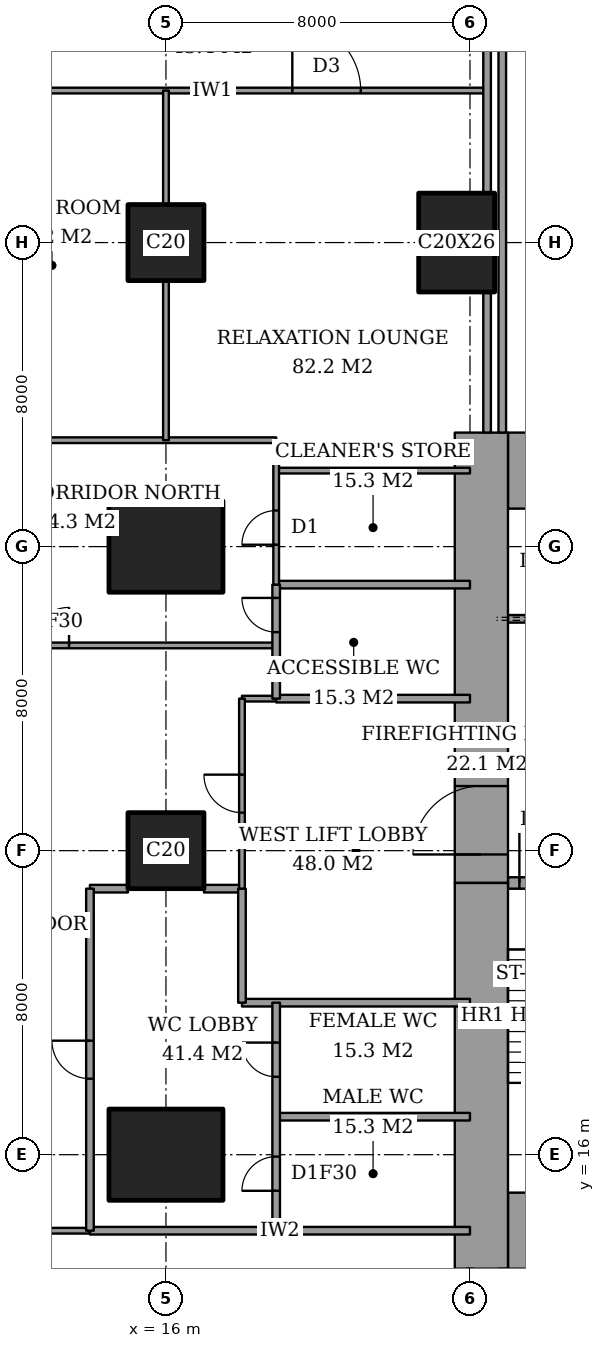
"""IFC4 building model, lengths in metres.
Left out: names, types, materials, properties, quantities, classifications, styles, units other than length and angle.
Written with IfcOpenShell. Run it as: python <this file> out.ifc"""

import sys

from ifc_helpers import new_model, si_unit, direction, frame, frame_2d, origin, origin_2d, place, context, subcontext, project, spatial, rectangle, extrude, element, fill, save


model = new_model("IFC4")
c1 = context("Model", 3, precision=1e-05, world=origin(), true_north=direction((0.0, 1.0)))
c2 = subcontext(c1, "Body", "Model", "MODEL_VIEW")
j1 = project(units=[si_unit("LENGTHUNIT", "METRE"), si_unit("PLANEANGLEUNIT", "RADIAN")], contexts=[c1])
p1 = place(None, origin())
s1 = spatial("IfcSite", under=j1, at=p1, CompositionType="ELEMENT")
p2 = place(p1, origin())
s2 = spatial("IfcBuilding", under=s1, at=p2, CompositionType="ELEMENT")
p3 = place(p2, frame((0.0, 0.0, 11.0)))
s3 = spatial("IfcBuildingStorey", under=s2, at=p3, CompositionType="ELEMENT", Elevation=11.0)
p4 = place(p3, frame((16.0, 16.0, 0.0), z_axis=(0.0, 0.0, 1.0), x_axis=(1.0, 0.0, 0.0)))
e1 = element("IfcColumn", 1, at=p4, inside=s3, PredefinedType="COLUMN", context=c2, shape_type="SweptSolid", body=[
    extrude(rectangle(XDim=3.0, YDim=2.4, at=origin_2d()), origin(), (0.0, 0.0, 1.0), 5.0),
])
p5 = place(p3, frame((16.0, 24.0, 0.0), z_axis=(0.0, 0.0, 1.0), x_axis=(1.0, 0.0, 0.0)))
e2 = element("IfcColumn", 2, at=p5, inside=s3, PredefinedType="COLUMN", context=c2, shape_type="SweptSolid", body=[
    extrude(rectangle(XDim=2.0, YDim=2.0, at=origin_2d()), origin(), (0.0, 0.0, 1.0), 5.0),
])
p6 = place(p3, frame((16.0, 32.0, 0.0), z_axis=(0.0, 0.0, 1.0), x_axis=(1.0, 0.0, 0.0)))
e3 = element("IfcColumn", 3, at=p6, inside=s3, PredefinedType="COLUMN", context=c2, shape_type="SweptSolid", body=[
    extrude(rectangle(XDim=3.0, YDim=2.4, at=origin_2d()), origin(), (0.0, 0.0, 1.0), 5.0),
])
p7 = place(p3, frame((16.0, 40.0, 0.0), z_axis=(0.0, 0.0, 1.0), x_axis=(1.0, 0.0, 0.0)))
e4 = element("IfcColumn", 4, at=p7, inside=s3, PredefinedType="COLUMN", context=c2, shape_type="SweptSolid", body=[
    extrude(rectangle(XDim=2.0, YDim=2.0, at=origin_2d()), origin(), (0.0, 0.0, 1.0), 5.0),
])
p8 = place(p3, frame((23.65, 40.0, 0.0), z_axis=(0.0, 0.0, 1.0), x_axis=(1.0, 0.0, 0.0)))
e5 = element("IfcColumn", 5, at=p8, inside=s3, PredefinedType="COLUMN", context=c2, shape_type="SweptSolid", body=[
    extrude(rectangle(XDim=2.0, YDim=2.6, at=origin_2d()), origin(), (0.0, 0.0, 1.0), 5.0),
])
for number, where, z_axis, x_axis in (
    (6, (25.0, 14.0, 0.0), (0.0, 0.0, 1.0), (1.0, 0.0, 0.0)),
    (7, (25.0, 34.0, 0.0), (0.0, 0.0, 1.0), (1.0, 0.0, 0.0)),
):
    element("IfcWall", number, at=place(p3, frame(where, z_axis=z_axis, x_axis=x_axis)), inside=s3, PredefinedType="SHEAR", context=c2, shape_type="SweptSolid", body=[
        extrude(rectangle(XDim=3.15, YDim=2.0, at=frame_2d((1.575, 0.0))), origin(), (0.0, 0.0, 1.0), 5.0),
    ])
p9 = place(p3, frame((24.3, 13.0, 0.0), z_axis=(0.0, 0.0, 1.0), x_axis=(0.0, 1.0, 0.0)))
e8 = element("IfcWall", 8, at=p9, inside=s3, PredefinedType="SHEAR", context=c2, shape_type="SweptSolid", body=[
    extrude(rectangle(XDim=10.15, YDim=1.4, at=frame_2d((5.075, 0.0))), origin(), (0.0, 0.0, 1.0), 5.0),
])
p10 = place(p3, frame((24.3, 23.15, 0.0), z_axis=(0.0, 0.0, 1.0), x_axis=(0.0, 1.0, 0.0)))
e9 = element("IfcWall", 9, at=p10, inside=s3, PredefinedType="SHEAR", context=c2, shape_type="SweptSolid", body=[
    extrude(rectangle(XDim=11.85, YDim=1.4, at=frame_2d((5.925, 0.0))), origin(), (0.0, 0.0, 1.0), 5.0),
])
p11 = place(p10, frame((0.75, 0.0, 0.0)))
e10 = element("IfcOpeningElement", 10, at=p11, cuts=e9, PredefinedType="OPENING", context=c2, shape_type="SweptSolid", body=[
    extrude(rectangle(XDim=1.8, YDim=2.4, at=frame_2d((0.9, 1.2))), frame((0.0, 0.71, 0.0), z_axis=(0.0, -1.0, 0.0), x_axis=(1.0, 0.0, 0.0)), (0.0, 0.0, 1.0), 1.42),
])
p12 = place(p3, frame((25.0, 23.15, 0.0), z_axis=(0.0, 0.0, 1.0), x_axis=(1.0, 0.0, 0.0)))
e11 = element("IfcWall", 11, at=p12, inside=s3, PredefinedType="SHEAR", context=c2, shape_type="SweptSolid", body=[
    extrude(rectangle(XDim=3.15, YDim=0.3, at=frame_2d((1.575, 0.0))), origin(), (0.0, 0.0, 1.0), 5.0),
])
p13 = place(p12, frame((0.3, 0.0, 0.0)))
e12 = element("IfcOpeningElement", 12, at=p13, cuts=e11, PredefinedType="OPENING", context=c2, shape_type="SweptSolid", body=[
    extrude(rectangle(XDim=1.6, YDim=2.1, at=frame_2d((0.8, 1.05))), frame((0.0, 0.16, 0.0), z_axis=(0.0, -1.0, 0.0), x_axis=(1.0, 0.0, 0.0)), (0.0, 0.0, 1.0), 0.32),
])
p14 = place(p3, frame((14.0, 14.0, 0.0), z_axis=(0.0, 0.0, 1.0), x_axis=(1.0, 0.0, 0.0)))
e13 = element("IfcWall", 13, at=p14, inside=s3, PredefinedType="PARTITIONING", context=c2, shape_type="SweptSolid", body=[
    extrude(rectangle(XDim=10.0, YDim=0.2, at=frame_2d((5.0, 0.0))), origin(), (0.0, 0.0, 1.0), 4.7),
])
p15 = place(p3, frame((9.5, 14.0, 0.0), z_axis=(0.0, 0.0, 1.0), x_axis=(1.0, 0.0, 0.0)))
e14 = element("IfcWall", 14, at=p15, inside=s3, PredefinedType="PARTITIONING", context=c2, shape_type="SweptSolid", body=[
    extrude(rectangle(XDim=4.5, YDim=0.15, at=frame_2d((2.25, 0.0))), origin(), (0.0, 0.0, 1.0), 4.7),
])
p16 = place(p15, frame((1.75, 0.0, 0.0)))
e15 = element("IfcOpeningElement", 15, at=p16, cuts=e14, PredefinedType="OPENING", context=c2, shape_type="SweptSolid", body=[
    extrude(rectangle(XDim=1.0, YDim=2.1, at=frame_2d((0.5, 1.05))), frame((0.0, 0.085, 0.0), z_axis=(0.0, -1.0, 0.0), x_axis=(1.0, 0.0, 0.0)), (0.0, 0.0, 1.0), 0.17),
])
p17 = place(p3, frame((18.9, 17.0, 0.0), z_axis=(0.0, 0.0, 1.0), x_axis=(1.0, 0.0, 0.0)))
e16 = element("IfcWall", 16, at=p17, inside=s3, PredefinedType="PARTITIONING", context=c2, shape_type="SweptSolid", body=[
    extrude(rectangle(XDim=5.1, YDim=0.2, at=frame_2d((2.55, 0.0))), origin(), (0.0, 0.0, 1.0), 4.7),
])
p18 = place(p3, frame((18.0, 20.0, 0.0), z_axis=(0.0, 0.0, 1.0), x_axis=(1.0, 0.0, 0.0)))
e17 = element("IfcWall", 17, at=p18, inside=s3, PredefinedType="PARTITIONING", context=c2, shape_type="SweptSolid", body=[
    extrude(rectangle(XDim=6.0, YDim=0.2, at=frame_2d((3.0, 0.0))), origin(), (0.0, 0.0, 1.0), 4.7),
])
for number, where, z_axis, x_axis in (
    (18, (14.0, 23.0, 0.0), (0.0, 0.0, 1.0), (1.0, 0.0, 0.0)),
    (19, (17.0, 23.0, 0.0), (0.0, 0.0, 1.0), (1.0, 0.0, 0.0)),
):
    element("IfcWall", number, at=place(p3, frame(where, z_axis=z_axis, x_axis=x_axis)), inside=s3, PredefinedType="PARTITIONING", context=c2, shape_type="SweptSolid", body=[
        extrude(rectangle(XDim=1.0, YDim=0.2, at=frame_2d((0.5, 0.0))), origin(), (0.0, 0.0, 1.0), 4.7),
    ])
p19 = place(p3, frame((18.9, 28.0, 0.0), z_axis=(0.0, 0.0, 1.0), x_axis=(1.0, 0.0, 0.0)))
e20 = element("IfcWall", 20, at=p19, inside=s3, PredefinedType="PARTITIONING", context=c2, shape_type="SweptSolid", body=[
    extrude(rectangle(XDim=5.1, YDim=0.2, at=frame_2d((2.55, 0.0))), origin(), (0.0, 0.0, 1.0), 4.7),
])
p20 = place(p3, frame((18.0, 28.0, 0.0), z_axis=(0.0, 0.0, 1.0), x_axis=(1.0, 0.0, 0.0)))
e21 = element("IfcWall", 21, at=p20, inside=s3, PredefinedType="PARTITIONING", context=c2, shape_type="SweptSolid", body=[
    extrude(rectangle(XDim=0.9, YDim=0.15, at=frame_2d((0.45, 0.0))), origin(), (0.0, 0.0, 1.0), 4.7),
])
p21 = place(p3, frame((6.0, 29.4, 0.0), z_axis=(0.0, 0.0, 1.0), x_axis=(1.0, 0.0, 0.0)))
e22 = element("IfcWall", 22, at=p21, inside=s3, PredefinedType="PARTITIONING", context=c2, shape_type="SweptSolid", body=[
    extrude(rectangle(XDim=12.9, YDim=0.15, at=frame_2d((6.45, 0.0))), origin(), (0.0, 0.0, 1.0), 4.7),
])
p22 = place(p21, frame((6.45, 0.0, 0.0)))
e23 = element("IfcOpeningElement", 23, at=p22, cuts=e22, PredefinedType="OPENING", context=c2, shape_type="SweptSolid", body=[
    extrude(rectangle(XDim=1.0, YDim=2.1, at=frame_2d((0.5, 1.05))), frame((0.0, 0.085, 0.0), z_axis=(0.0, -1.0, 0.0), x_axis=(1.0, 0.0, 0.0)), (0.0, 0.0, 1.0), 0.17),
])
p23 = place(p3, frame((18.9, 31.0, 0.0), z_axis=(0.0, 0.0, 1.0), x_axis=(1.0, 0.0, 0.0)))
e24 = element("IfcWall", 24, at=p23, inside=s3, PredefinedType="PARTITIONING", context=c2, shape_type="SweptSolid", body=[
    extrude(rectangle(XDim=5.1, YDim=0.2, at=frame_2d((2.55, 0.0))), origin(), (0.0, 0.0, 1.0), 4.7),
])
p24 = place(p3, frame((18.9, 34.0, 0.0), z_axis=(0.0, 0.0, 1.0), x_axis=(1.0, 0.0, 0.0)))
e25 = element("IfcWall", 25, at=p24, inside=s3, PredefinedType="PARTITIONING", context=c2, shape_type="SweptSolid", body=[
    extrude(rectangle(XDim=5.1, YDim=0.15, at=frame_2d((2.55, 0.0))), origin(), (0.0, 0.0, 1.0), 4.7),
])
p25 = place(p3, frame((7.0, 34.8, 0.0), z_axis=(0.0, 0.0, 1.0), x_axis=(1.0, 0.0, 0.0)))
e26 = element("IfcWall", 26, at=p25, inside=s3, PredefinedType="PARTITIONING", context=c2, shape_type="SweptSolid", body=[
    extrude(rectangle(XDim=11.9, YDim=0.15, at=frame_2d((5.95, 0.0))), origin(), (0.0, 0.0, 1.0), 4.7),
])
p26 = place(p25, frame((1.0, 0.0, 0.0)))
e27 = element("IfcOpeningElement", 27, at=p26, cuts=e26, PredefinedType="OPENING", context=c2, shape_type="SweptSolid", body=[
    extrude(rectangle(XDim=1.0, YDim=2.1, at=frame_2d((0.5, 1.05))), frame((0.0, 0.085, 0.0), z_axis=(0.0, -1.0, 0.0), x_axis=(1.0, 0.0, 0.0)), (0.0, 0.0, 1.0), 0.17),
])
p27 = place(p3, frame((10.0, 44.0, 0.0), z_axis=(0.0, 0.0, 1.0), x_axis=(1.0, 0.0, 0.0)))
e28 = element("IfcWall", 28, at=p27, inside=s3, PredefinedType="PARTITIONING", context=c2, shape_type="SweptSolid", body=[
    extrude(rectangle(XDim=14.45, YDim=0.15, at=frame_2d((7.225, 0.0))), origin(), (0.0, 0.0, 1.0), 4.7),
])
p28 = place(p27, frame((9.325, 0.0, 0.0)))
e29 = element("IfcOpeningElement", 29, at=p28, cuts=e28, PredefinedType="OPENING", context=c2, shape_type="SweptSolid", body=[
    extrude(rectangle(XDim=1.8, YDim=2.1, at=frame_2d((0.9, 1.05))), frame((0.0, 0.085, 0.0), z_axis=(0.0, -1.0, 0.0), x_axis=(1.0, 0.0, 0.0)), (0.0, 0.0, 1.0), 0.17),
])
p29 = place(p3, frame((14.0, 14.0, 0.0), z_axis=(0.0, 0.0, 1.0), x_axis=(0.0, 1.0, 0.0)))
e30 = element("IfcWall", 30, at=p29, inside=s3, PredefinedType="PARTITIONING", context=c2, shape_type="SweptSolid", body=[
    extrude(rectangle(XDim=9.0, YDim=0.2, at=frame_2d((4.5, 0.0))), origin(), (0.0, 0.0, 1.0), 4.7),
])
p30 = place(p29, frame((4.0, 0.0, 0.0)))
e31 = element("IfcOpeningElement", 31, at=p30, cuts=e30, PredefinedType="OPENING", context=c2, shape_type="SweptSolid", body=[
    extrude(rectangle(XDim=1.0, YDim=2.1, at=frame_2d((0.5, 1.05))), frame((0.0, 0.11, 0.0), z_axis=(0.0, -1.0, 0.0), x_axis=(1.0, 0.0, 0.0)), (0.0, 0.0, 1.0), 0.22),
])
p31 = place(p3, frame((16.0, 34.8, 0.0), z_axis=(0.0, 0.0, 1.0), x_axis=(0.0, 1.0, 0.0)))
e32 = element("IfcWall", 32, at=p31, inside=s3, PredefinedType="PARTITIONING", context=c2, shape_type="SweptSolid", body=[
    extrude(rectangle(XDim=4.2, YDim=0.15, at=frame_2d((2.1, 0.0))), origin(), (0.0, 0.0, 1.0), 3.3),
])
p32 = place(p3, frame((16.0, 41.0, 0.0), z_axis=(0.0, 0.0, 1.0), x_axis=(0.0, 1.0, 0.0)))
e33 = element("IfcWall", 33, at=p32, inside=s3, PredefinedType="PARTITIONING", context=c2, shape_type="SweptSolid", body=[
    extrude(rectangle(XDim=3.0, YDim=0.15, at=frame_2d((1.5, 0.0))), origin(), (0.0, 0.0, 1.0), 3.3),
])
p33 = place(p3, frame((18.0, 20.0, 0.0), z_axis=(0.0, 0.0, 1.0), x_axis=(0.0, 1.0, 0.0)))
e34 = element("IfcWall", 34, at=p33, inside=s3, PredefinedType="PARTITIONING", context=c2, shape_type="SweptSolid", body=[
    extrude(rectangle(XDim=3.0, YDim=0.2, at=frame_2d((1.5, 0.0))), origin(), (0.0, 0.0, 1.0), 4.7),
])
p34 = place(p3, frame((18.0, 23.0, 0.0), z_axis=(0.0, 0.0, 1.0), x_axis=(0.0, 1.0, 0.0)))
e35 = element("IfcWall", 35, at=p34, inside=s3, PredefinedType="PARTITIONING", context=c2, shape_type="SweptSolid", body=[
    extrude(rectangle(XDim=5.0, YDim=0.15, at=frame_2d((2.5, 0.0))), origin(), (0.0, 0.0, 1.0), 4.7),
])
p35 = place(p34, frame((2.0, 0.0, 0.0)))
e36 = element("IfcOpeningElement", 36, at=p35, cuts=e35, PredefinedType="OPENING", context=c2, shape_type="SweptSolid", body=[
    extrude(rectangle(XDim=1.0, YDim=2.1, at=frame_2d((0.5, 1.05))), frame((0.0, 0.085, 0.0), z_axis=(0.0, -1.0, 0.0), x_axis=(1.0, 0.0, 0.0)), (0.0, 0.0, 1.0), 0.17),
])
p36 = place(p3, frame((18.9, 14.0, 0.0), z_axis=(0.0, 0.0, 1.0), x_axis=(0.0, 1.0, 0.0)))
e37 = element("IfcWall", 37, at=p36, inside=s3, PredefinedType="PARTITIONING", context=c2, shape_type="SweptSolid", body=[
    extrude(rectangle(XDim=6.0, YDim=0.2, at=frame_2d((3.0, 0.0))), origin(), (0.0, 0.0, 1.0), 4.7),
])
p37 = place(p36, frame((1.05, 0.0, 0.0)))
e38 = element("IfcOpeningElement", 38, at=p37, cuts=e37, PredefinedType="OPENING", context=c2, shape_type="SweptSolid", body=[
    extrude(rectangle(XDim=0.9, YDim=2.1, at=frame_2d((0.45, 1.05))), frame((0.0, 0.11, 0.0), z_axis=(0.0, -1.0, 0.0), x_axis=(1.0, 0.0, 0.0)), (0.0, 0.0, 1.0), 0.22),
])
p38 = place(p36, frame((4.05, 0.0, 0.0)))
e39 = element("IfcOpeningElement", 39, at=p38, cuts=e37, PredefinedType="OPENING", context=c2, shape_type="SweptSolid", body=[
    extrude(rectangle(XDim=0.9, YDim=2.1, at=frame_2d((0.45, 1.05))), frame((0.0, 0.11, 0.0), z_axis=(0.0, -1.0, 0.0), x_axis=(1.0, 0.0, 0.0)), (0.0, 0.0, 1.0), 0.22),
])
p39 = place(p3, frame((18.9, 28.0, 0.0), z_axis=(0.0, 0.0, 1.0), x_axis=(0.0, 1.0, 0.0)))
e40 = element("IfcWall", 40, at=p39, inside=s3, PredefinedType="PARTITIONING", context=c2, shape_type="SweptSolid", body=[
    extrude(rectangle(XDim=3.0, YDim=0.2, at=frame_2d((1.5, 0.0))), origin(), (0.0, 0.0, 1.0), 4.7),
])
p40 = place(p39, frame((1.75, 0.0, 0.0)))
e41 = element("IfcOpeningElement", 41, at=p40, cuts=e40, PredefinedType="OPENING", context=c2, shape_type="SweptSolid", body=[
    extrude(rectangle(XDim=0.9, YDim=2.1, at=frame_2d((0.45, 1.05))), frame((0.0, 0.11, 0.0), z_axis=(0.0, -1.0, 0.0), x_axis=(1.0, 0.0, 0.0)), (0.0, 0.0, 1.0), 0.22),
])
p41 = place(p3, frame((18.9, 31.0, 0.0), z_axis=(0.0, 0.0, 1.0), x_axis=(0.0, 1.0, 0.0)))
e42 = element("IfcWall", 42, at=p41, inside=s3, PredefinedType="PARTITIONING", context=c2, shape_type="SweptSolid", body=[
    extrude(rectangle(XDim=3.8, YDim=0.15, at=frame_2d((1.9, 0.0))), origin(), (0.0, 0.0, 1.0), 4.7),
])
p42 = place(p41, frame((1.05, 0.0, 0.0)))
e43 = element("IfcOpeningElement", 43, at=p42, cuts=e42, PredefinedType="OPENING", context=c2, shape_type="SweptSolid", body=[
    extrude(rectangle(XDim=0.9, YDim=2.1, at=frame_2d((0.45, 1.05))), frame((0.0, 0.085, 0.0), z_axis=(0.0, -1.0, 0.0), x_axis=(1.0, 0.0, 0.0)), (0.0, 0.0, 1.0), 0.17),
])
for number, where, z_axis, x_axis in (
    (44, (24.0, 9.3, 0.0), (0.0, 0.0, 1.0), (0.0, 1.0, 0.0)),
    (45, (24.45, 35.0, 0.0), (0.0, 0.0, 1.0), (0.0, 1.0, 0.0)),
):
    element("IfcWall", number, at=place(p3, frame(where, z_axis=z_axis, x_axis=x_axis)), inside=s3, PredefinedType="PARTITIONING", context=c2, shape_type="SweptSolid", body=[
        extrude(rectangle(XDim=3.7, YDim=0.2, at=frame_2d((1.85, 0.0))), origin(), (0.0, 0.0, 1.0), 4.7),
    ])
p43 = place(p3, frame((24.45, 41.3, 0.0), z_axis=(0.0, 0.0, 1.0), x_axis=(0.0, 1.0, 0.0)))
e46 = element("IfcWall", 46, at=p43, inside=s3, PredefinedType="PARTITIONING", context=c2, shape_type="SweptSolid", body=[
    extrude(rectangle(XDim=5.35, YDim=0.2, at=frame_2d((2.675, 0.0))), origin(), (0.0, 0.0, 1.0), 4.7),
])
for number, where, z_axis, x_axis in (
    (47, (24.85, -0.45, 0.0), (0.0, 0.0, 1.0), (0.0, 1.0, 0.0)),
    (48, (24.85, 35.0, 0.0), (0.0, 0.0, 1.0), (0.0, 1.0, 0.0)),
):
    element("IfcWall", number, at=place(p3, frame(where, z_axis=z_axis, x_axis=x_axis)), inside=s3, PredefinedType="PARTITIONING", context=c2, shape_type="SweptSolid", body=[
        extrude(rectangle(XDim=13.45, YDim=0.2, at=frame_2d((6.725, 0.0))), origin(), (0.0, 0.0, 1.0), 4.7),
    ])
p44 = place(p3, frame((25.0, 30.1, 0.0), z_axis=(0.0, 0.0, 1.0), x_axis=(1.0, 0.0, 0.0)))
e49 = element("IfcWall", 49, at=p44, inside=s3, PredefinedType="PARTITIONING", context=c2, shape_type="SweptSolid", body=[
    extrude(rectangle(XDim=12.7, YDim=0.2, at=frame_2d((6.35, 0.0))), origin(), (0.0, 0.0, 1.0), 5.0),
])
p45 = place(p44, frame((0.9, 0.0, 0.0)))
e50 = element("IfcOpeningElement", 50, at=p45, cuts=e49, PredefinedType="OPENING", context=c2, shape_type="SweptSolid", body=[
    extrude(rectangle(XDim=1.2, YDim=2.1, at=frame_2d((0.6, 1.05))), frame((0.0, 0.11, 0.0), z_axis=(0.0, -1.0, 0.0), x_axis=(1.0, 0.0, 0.0)), (0.0, 0.0, 1.0), 0.22),
])
p46 = place(p28, origin())
e51 = element("IfcDoor", 51, at=p46, inside=s3, OperationType="DOUBLE_DOOR_DOUBLE_SWING", PredefinedType="DOOR", context=c2, shape_type="SweptSolid", body=[
    extrude(rectangle(XDim=1.8, YDim=2.1, at=frame_2d((0.9, 1.05))), frame((0.0, 0.025, 0.0), z_axis=(0.0, -1.0, 0.0), x_axis=(1.0, 0.0, 0.0)), (0.0, 0.0, 1.0), 0.05),
])
fill(e29, e51)
p47 = place(p30, origin())
e52 = element("IfcDoor", 52, at=p47, inside=s3, OperationType="SINGLE_SWING_LEFT", PredefinedType="DOOR", context=c2, shape_type="SweptSolid", body=[
    extrude(rectangle(XDim=1.0, YDim=2.1, at=frame_2d((0.5, 1.05))), frame((0.0, 0.025, 0.0), z_axis=(0.0, -1.0, 0.0), x_axis=(1.0, 0.0, 0.0)), (0.0, 0.0, 1.0), 0.05),
])
fill(e31, e52)
p48 = place(p35, origin())
e53 = element("IfcDoor", 53, at=p48, inside=s3, OperationType="SINGLE_SWING_LEFT", PredefinedType="DOOR", context=c2, shape_type="SweptSolid", body=[
    extrude(rectangle(XDim=1.0, YDim=2.1, at=frame_2d((0.5, 1.05))), frame((0.0, 0.025, 0.0), z_axis=(0.0, -1.0, 0.0), x_axis=(1.0, 0.0, 0.0)), (0.0, 0.0, 1.0), 0.05),
])
fill(e36, e53)
p49 = place(p37, origin())
e54 = element("IfcDoor", 54, at=p49, inside=s3, OperationType="SINGLE_SWING_RIGHT", PredefinedType="DOOR", context=c2, shape_type="SweptSolid", body=[
    extrude(rectangle(XDim=0.9, YDim=2.1, at=frame_2d((0.45, 1.05))), frame((0.0, 0.025, 0.0), z_axis=(0.0, -1.0, 0.0), x_axis=(1.0, 0.0, 0.0)), (0.0, 0.0, 1.0), 0.05),
])
fill(e38, e54)
p50 = place(p38, origin())
e55 = element("IfcDoor", 55, at=p50, inside=s3, OperationType="SINGLE_SWING_LEFT", PredefinedType="DOOR", context=c2, shape_type="SweptSolid", body=[
    extrude(rectangle(XDim=0.9, YDim=2.1, at=frame_2d((0.45, 1.05))), frame((0.0, 0.025, 0.0), z_axis=(0.0, -1.0, 0.0), x_axis=(1.0, 0.0, 0.0)), (0.0, 0.0, 1.0), 0.05),
])
fill(e39, e55)
p51 = place(p40, origin())
e56 = element("IfcDoor", 56, at=p51, inside=s3, OperationType="SINGLE_SWING_LEFT", PredefinedType="DOOR", context=c2, shape_type="SweptSolid", body=[
    extrude(rectangle(XDim=0.9, YDim=2.1, at=frame_2d((0.45, 1.05))), frame((0.0, 0.025, 0.0), z_axis=(0.0, -1.0, 0.0), x_axis=(1.0, 0.0, 0.0)), (0.0, 0.0, 1.0), 0.05),
])
fill(e41, e56)
p52 = place(p22, origin())
e57 = element("IfcDoor", 57, at=p52, inside=s3, OperationType="SINGLE_SWING_LEFT", PredefinedType="DOOR", context=c2, shape_type="SweptSolid", body=[
    extrude(rectangle(XDim=1.0, YDim=2.1, at=frame_2d((0.5, 1.05))), frame((0.0, 0.025, 0.0), z_axis=(0.0, -1.0, 0.0), x_axis=(1.0, 0.0, 0.0)), (0.0, 0.0, 1.0), 0.05),
])
fill(e23, e57)
p53 = place(p42, origin())
e58 = element("IfcDoor", 58, at=p53, inside=s3, OperationType="SINGLE_SWING_RIGHT", PredefinedType="DOOR", context=c2, shape_type="SweptSolid", body=[
    extrude(rectangle(XDim=0.9, YDim=2.1, at=frame_2d((0.45, 1.05))), frame((0.0, 0.025, 0.0), z_axis=(0.0, -1.0, 0.0), x_axis=(1.0, 0.0, 0.0)), (0.0, 0.0, 1.0), 0.05),
])
fill(e43, e58)
p54 = place(p13, origin())
e59 = element("IfcDoor", 59, at=p54, inside=s3, OperationType="DOUBLE_DOOR_SINGLE_SWING", PredefinedType="DOOR", context=c2, shape_type="SweptSolid", body=[
    extrude(rectangle(XDim=1.6, YDim=2.1, at=frame_2d((0.8, 1.05))), frame((0.0, 0.025, 0.0), z_axis=(0.0, -1.0, 0.0), x_axis=(1.0, 0.0, 0.0)), (0.0, 0.0, 1.0), 0.05),
])
fill(e12, e59)
p55 = place(p11, origin())
e60 = element("IfcDoor", 60, at=p55, inside=s3, OperationType="DOUBLE_DOOR_DOUBLE_SWING", PredefinedType="DOOR", context=c2, shape_type="SweptSolid", body=[
    extrude(rectangle(XDim=1.8, YDim=2.4, at=frame_2d((0.9, 1.2))), frame((0.0, 0.025, 0.0), z_axis=(0.0, -1.0, 0.0), x_axis=(1.0, 0.0, 0.0)), (0.0, 0.0, 1.0), 0.05),
])
fill(e10, e60)
save(model, sys.argv[1])
